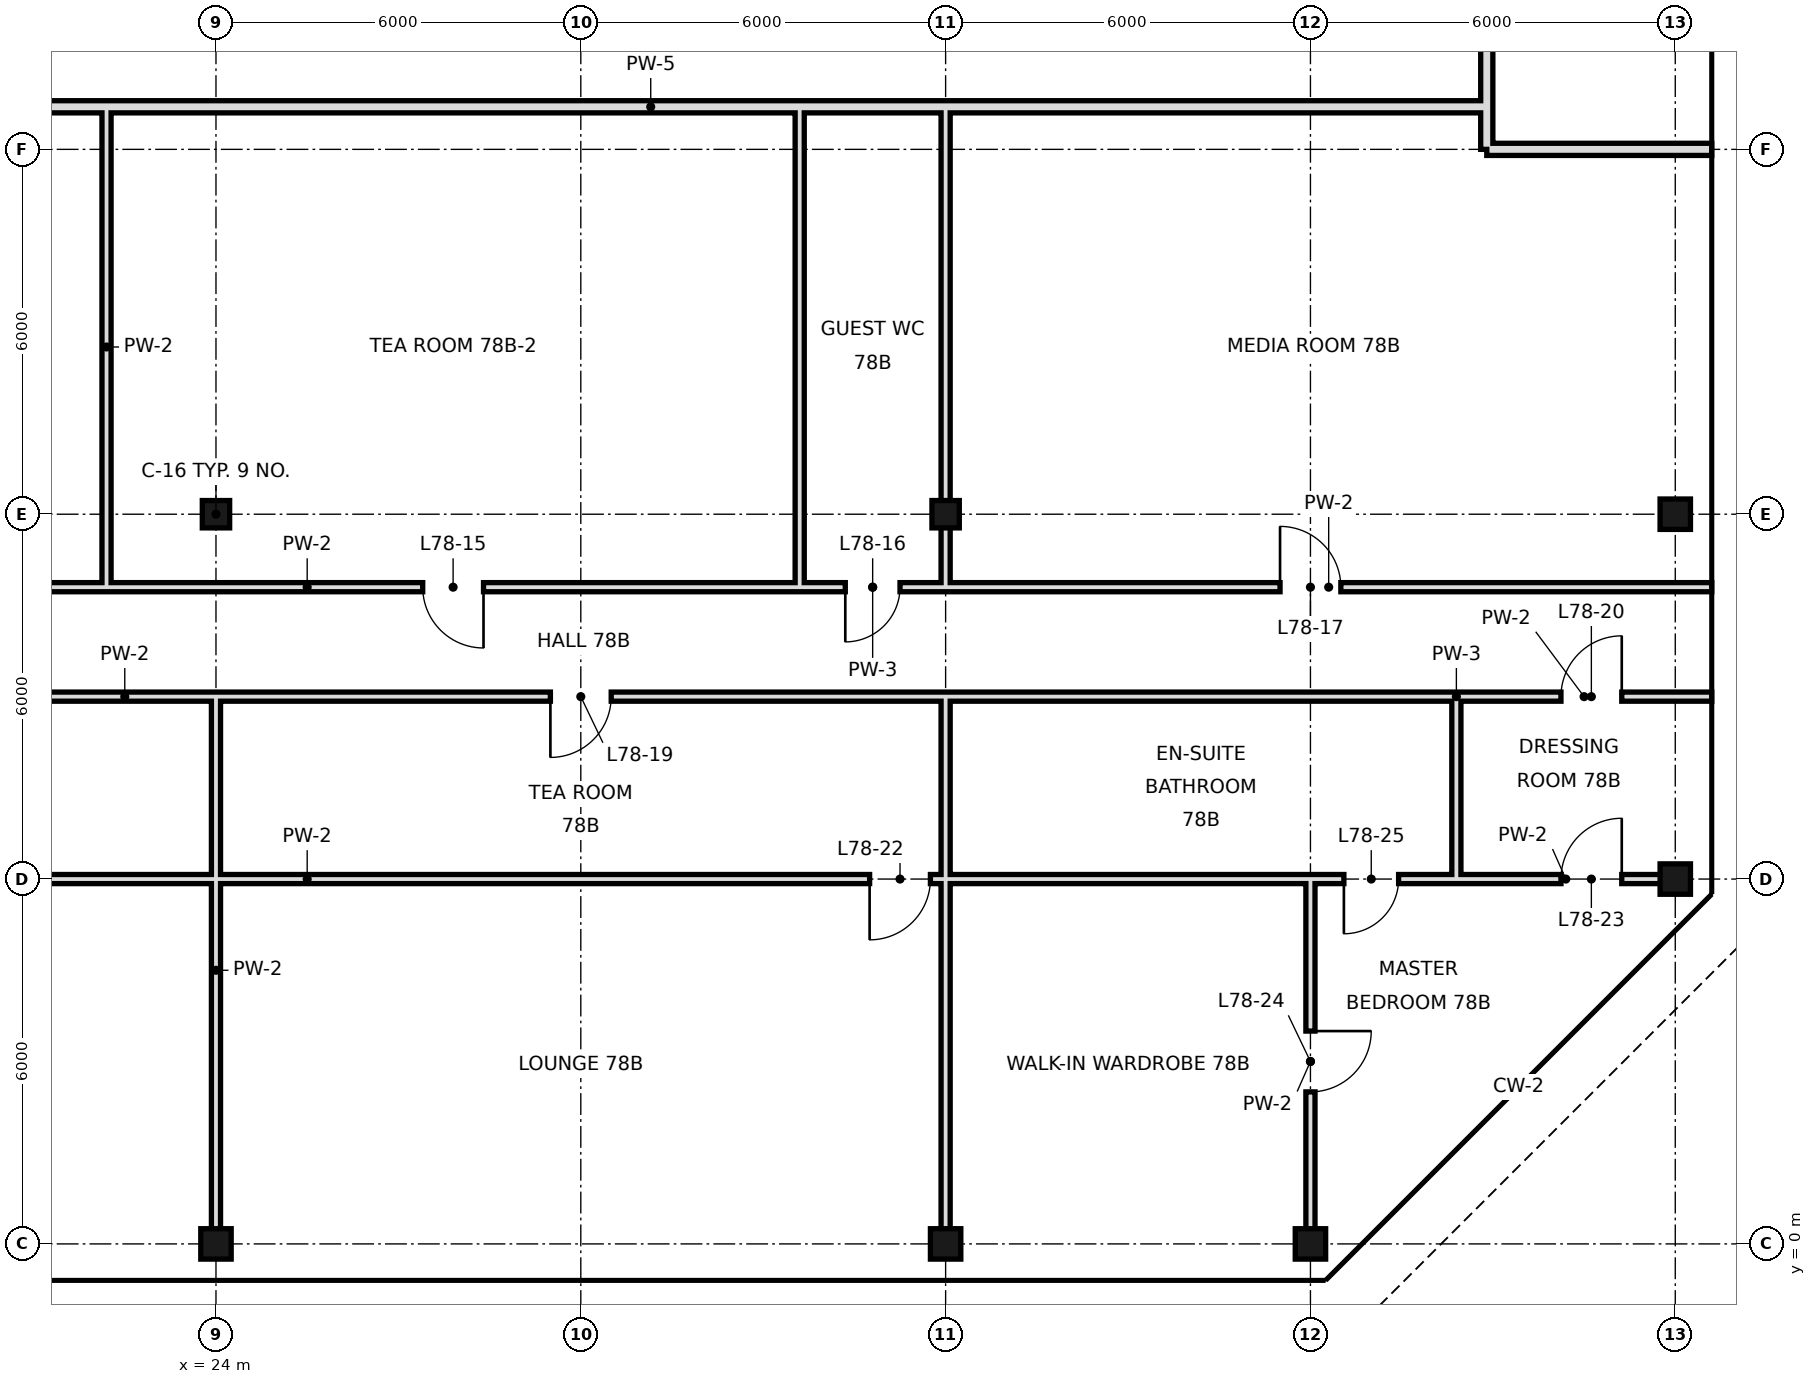
"""IFC4 building model, lengths in metres.
Left out: names, types, materials, properties, quantities, classifications, styles, units other than length and angle.
Written with IfcOpenShell. Run it as: python <this file> out.ifc"""

import sys

from ifc_helpers import new_model, si_unit, direction, frame, frame_2d, origin, origin_2d, place, context, subcontext, project, spatial, rectangle, hollow_rectangle, extrude, element, fill, save


model = new_model("IFC4")
c1 = context("Model", 3, precision=1e-05, world=origin(), true_north=direction((0.0, 1.0)))
c2 = subcontext(c1, "Body", "Model", "MODEL_VIEW")
j1 = project(units=[si_unit("LENGTHUNIT", "METRE"), si_unit("PLANEANGLEUNIT", "RADIAN")], contexts=[c1])
p1 = place(None, origin())
s1 = spatial("IfcSite", under=j1, at=p1, CompositionType="ELEMENT")
p2 = place(p1, origin())
s2 = spatial("IfcBuilding", under=s1, at=p2, CompositionType="ELEMENT")
p3 = place(p2, frame((0.0, 0.0, 326.8)))
s3 = spatial("IfcBuildingStorey", under=s2, at=p3, CompositionType="ELEMENT", Elevation=326.8)
p4 = place(p3, frame((24.0, 0.0, 0.0), z_axis=(0.0, 0.0, 1.0), x_axis=(1.0, 0.0, 0.0)))
e1 = element("IfcColumn", 1, at=p4, inside=s3, PredefinedType="COLUMN", context=c2, shape_type="SweptSolid", body=[
    extrude(hollow_rectangle(XDim=0.5, YDim=0.5, WallThickness=0.025, at=origin_2d()), origin(), (0.0, 0.0, 1.0), 4.4),
])
p5 = place(p3, frame((24.0, 12.0, 0.0), z_axis=(0.0, 0.0, 1.0), x_axis=(1.0, 0.0, 0.0)))
e2 = element("IfcColumn", 2, at=p5, inside=s3, PredefinedType="COLUMN", context=c2, shape_type="SweptSolid", body=[
    extrude(hollow_rectangle(XDim=0.45, YDim=0.45, WallThickness=0.022, at=origin_2d()), origin(), (0.0, 0.0, 1.0), 4.4),
])
p6 = place(p3, frame((36.0, 0.0, 0.0), z_axis=(0.0, 0.0, 1.0), x_axis=(1.0, 0.0, 0.0)))
e3 = element("IfcColumn", 3, at=p6, inside=s3, PredefinedType="COLUMN", context=c2, shape_type="SweptSolid", body=[
    extrude(hollow_rectangle(XDim=0.5, YDim=0.5, WallThickness=0.025, at=origin_2d()), origin(), (0.0, 0.0, 1.0), 4.4),
])
p7 = place(p3, frame((36.0, 12.0, 0.0), z_axis=(0.0, 0.0, 1.0), x_axis=(1.0, 0.0, 0.0)))
e4 = element("IfcColumn", 4, at=p7, inside=s3, PredefinedType="COLUMN", context=c2, shape_type="SweptSolid", body=[
    extrude(hollow_rectangle(XDim=0.45, YDim=0.45, WallThickness=0.022, at=origin_2d()), origin(), (0.0, 0.0, 1.0), 4.4),
])
for number, where, z_axis, x_axis in (
    (5, (42.0, 0.0, 0.0), (0.0, 0.0, 1.0), (1.0, 0.0, 0.0)),
    (6, (48.0, 6.0, 0.0), (0.0, 0.0, 1.0), (1.0, 0.0, 0.0)),
    (7, (48.0, 12.0, 0.0), (0.0, 0.0, 1.0), (1.0, 0.0, 0.0)),
):
    element("IfcColumn", number, at=place(p3, frame(where, z_axis=z_axis, x_axis=x_axis)), inside=s3, PredefinedType="COLUMN", context=c2, shape_type="SweptSolid", body=[
        extrude(hollow_rectangle(XDim=0.5, YDim=0.5, WallThickness=0.025, at=origin_2d()), origin(), (0.0, 0.0, 1.0), 4.4),
    ])
p8 = place(p3, frame((22.2, 10.8, 0.0), z_axis=(0.0, 0.0, 1.0), x_axis=(0.0, 1.0, 0.0)))
e8 = element("IfcWall", 8, at=p8, inside=s3, PredefinedType="PARTITIONING", context=c2, shape_type="SweptSolid", body=[
    extrude(rectangle(XDim=7.9, YDim=0.15, at=frame_2d((3.95, 0.0))), origin(), (0.0, 0.0, 1.0), 4.1),
])
p9 = place(p3, frame((24.0, 0.0, 0.0), z_axis=(0.0, 0.0, 1.0), x_axis=(0.0, 1.0, 0.0)))
e9 = element("IfcWall", 9, at=p9, inside=s3, PredefinedType="PARTITIONING", context=c2, shape_type="SweptSolid", body=[
    extrude(rectangle(XDim=9.0, YDim=0.15, at=frame_2d((4.5, 0.0))), origin(), (0.0, 0.0, 1.0), 3.4),
])
p10 = place(p3, frame((33.6, 10.8, 0.0), z_axis=(0.0, 0.0, 1.0), x_axis=(0.0, 1.0, 0.0)))
e10 = element("IfcWall", 10, at=p10, inside=s3, PredefinedType="PARTITIONING", context=c2, shape_type="SweptSolid", body=[
    extrude(rectangle(XDim=7.9, YDim=0.15, at=frame_2d((3.95, 0.0))), origin(), (0.0, 0.0, 1.0), 4.1),
])
p11 = place(p3, frame((36.0, 0.0, 0.0), z_axis=(0.0, 0.0, 1.0), x_axis=(0.0, 1.0, 0.0)))
e11 = element("IfcWall", 11, at=p11, inside=s3, PredefinedType="PARTITIONING", context=c2, shape_type="SweptSolid", body=[
    extrude(rectangle(XDim=6.0, YDim=0.15, at=frame_2d((3.0, 0.0))), origin(), (0.0, 0.0, 1.0), 3.4),
])
p12 = place(p3, frame((36.0, 6.0, 0.0), z_axis=(0.0, 0.0, 1.0), x_axis=(0.0, 1.0, 0.0)))
e12 = element("IfcWall", 12, at=p12, inside=s3, PredefinedType="PARTITIONING", context=c2, shape_type="SweptSolid", body=[
    extrude(rectangle(XDim=3.0, YDim=0.15, at=frame_2d((1.5, 0.0))), origin(), (0.0, 0.0, 1.0), 3.4),
])
p13 = place(p3, frame((36.0, 10.8, 0.0), z_axis=(0.0, 0.0, 1.0), x_axis=(0.0, 1.0, 0.0)))
e13 = element("IfcWall", 13, at=p13, inside=s3, PredefinedType="PARTITIONING", context=c2, shape_type="SweptSolid", body=[
    extrude(rectangle(XDim=7.9, YDim=0.15, at=frame_2d((3.95, 0.0))), origin(), (0.0, 0.0, 1.0), 3.4),
])
p14 = place(p3, frame((42.0, 0.0, 0.0), z_axis=(0.0, 0.0, 1.0), x_axis=(0.0, 1.0, 0.0)))
e14 = element("IfcWall", 14, at=p14, inside=s3, PredefinedType="PARTITIONING", context=c2, shape_type="SweptSolid", body=[
    extrude(rectangle(XDim=6.0, YDim=0.15, at=frame_2d((3.0, 0.0))), origin(), (0.0, 0.0, 1.0), 3.4),
])
p15 = place(p14, frame((2.5, 0.0, 0.0)))
e15 = element("IfcOpeningElement", 15, at=p15, cuts=e14, PredefinedType="OPENING", context=c2, shape_type="SweptSolid", body=[
    extrude(rectangle(XDim=1.0, YDim=2.4, at=frame_2d((0.5, 1.2))), frame((0.0, 0.085, 0.0), z_axis=(0.0, -1.0, 0.0), x_axis=(1.0, 0.0, 0.0)), (0.0, 0.0, 1.0), 0.17),
])
p16 = place(p3, frame((44.4, 6.0, 0.0), z_axis=(0.0, 0.0, 1.0), x_axis=(0.0, 1.0, 0.0)))
e16 = element("IfcWall", 16, at=p16, inside=s3, PredefinedType="PARTITIONING", context=c2, shape_type="SweptSolid", body=[
    extrude(rectangle(XDim=3.0, YDim=0.15, at=frame_2d((1.5, 0.0))), origin(), (0.0, 0.0, 1.0), 4.1),
])
p17 = place(p3, frame((44.9, 18.0, 0.0), z_axis=(0.0, 0.0, 1.0), x_axis=(0.0, 1.0, 0.0)))
e17 = element("IfcWall", 17, at=p17, inside=s3, PredefinedType="SOLIDWALL", context=c2, shape_type="SweptSolid", body=[
    extrude(rectangle(XDim=27.949, YDim=0.2, at=frame_2d((13.975, 0.0))), origin(), (0.0, 0.0, 1.0), 3.5),
])
p18 = place(p17, frame((8.36, 0.0, 0.0)))
e18 = element("IfcOpeningElement", 18, at=p18, cuts=e17, PredefinedType="OPENING", context=c2, shape_type="SweptSolid", body=[
    extrude(rectangle(XDim=1.2, YDim=2.4, at=frame_2d((0.6, 1.2))), frame((0.0, 0.11, 0.0), z_axis=(0.0, -1.0, 0.0), x_axis=(1.0, 0.0, 0.0)), (0.0, 0.0, 1.0), 0.22),
])
p19 = place(p3, frame((17.4, 10.8, 0.0), z_axis=(0.0, 0.0, 1.0), x_axis=(1.0, 0.0, 0.0)))
e19 = element("IfcWall", 19, at=p19, inside=s3, PredefinedType="PARTITIONING", context=c2, shape_type="SweptSolid", body=[
    extrude(rectangle(XDim=16.2, YDim=0.15, at=frame_2d((8.1, 0.0))), origin(), (0.0, 0.0, 1.0), 4.1),
])
p20 = place(p19, frame((2.56, 0.0, 0.0)))
e20 = element("IfcOpeningElement", 20, at=p20, cuts=e19, PredefinedType="OPENING", context=c2, shape_type="SweptSolid", body=[
    extrude(rectangle(XDim=1.0, YDim=2.4, at=frame_2d((0.5, 1.2))), frame((0.0, 0.085, 0.0), z_axis=(0.0, -1.0, 0.0), x_axis=(1.0, 0.0, 0.0)), (0.0, 0.0, 1.0), 0.17),
])
p21 = place(p19, frame((10.0, 0.0, 0.0)))
e21 = element("IfcOpeningElement", 21, at=p21, cuts=e19, PredefinedType="OPENING", context=c2, shape_type="SweptSolid", body=[
    extrude(rectangle(XDim=1.0, YDim=2.4, at=frame_2d((0.5, 1.2))), frame((0.0, 0.085, 0.0), z_axis=(0.0, -1.0, 0.0), x_axis=(1.0, 0.0, 0.0)), (0.0, 0.0, 1.0), 0.17),
])
p22 = place(p3, frame((36.0, 10.8, 0.0), z_axis=(0.0, 0.0, 1.0), x_axis=(1.0, 0.0, 0.0)))
e22 = element("IfcWall", 22, at=p22, inside=s3, PredefinedType="PARTITIONING", context=c2, shape_type="SweptSolid", body=[
    extrude(rectangle(XDim=12.6, YDim=0.15, at=frame_2d((6.3, 0.0))), origin(), (0.0, 0.0, 1.0), 4.1),
])
p23 = place(p22, frame((5.5, 0.0, 0.0)))
e23 = element("IfcOpeningElement", 23, at=p23, cuts=e22, PredefinedType="OPENING", context=c2, shape_type="SweptSolid", body=[
    extrude(rectangle(XDim=1.0, YDim=2.4, at=frame_2d((0.5, 1.2))), frame((0.0, 0.085, 0.0), z_axis=(0.0, -1.0, 0.0), x_axis=(1.0, 0.0, 0.0)), (0.0, 0.0, 1.0), 0.17),
])
p24 = place(p3, frame((33.6, 10.8, 0.0), z_axis=(0.0, 0.0, 1.0), x_axis=(1.0, 0.0, 0.0)))
e24 = element("IfcWall", 24, at=p24, inside=s3, PredefinedType="PARTITIONING", context=c2, shape_type="SweptSolid", body=[
    extrude(rectangle(XDim=2.4, YDim=0.15, at=frame_2d((1.2, 0.0))), origin(), (0.0, 0.0, 1.0), 4.1),
])
p25 = place(p24, frame((0.75, 0.0, 0.0)))
e25 = element("IfcOpeningElement", 25, at=p25, cuts=e24, PredefinedType="OPENING", context=c2, shape_type="SweptSolid", body=[
    extrude(rectangle(XDim=0.9, YDim=2.4, at=frame_2d((0.45, 1.2))), frame((0.0, 0.085, 0.0), z_axis=(0.0, -1.0, 0.0), x_axis=(1.0, 0.0, 0.0)), (0.0, 0.0, 1.0), 0.17),
])
p26 = place(p3, frame((44.9, 18.0, 0.0), z_axis=(0.0, 0.0, 1.0), x_axis=(1.0, 0.0, 0.0)))
e26 = element("IfcWall", 26, at=p26, inside=s3, PredefinedType="SOLIDWALL", context=c2, shape_type="SweptSolid", body=[
    extrude(rectangle(XDim=3.7, YDim=0.2, at=frame_2d((1.85, 0.0))), origin(), (0.0, 0.0, 1.0), 3.4),
])
p27 = place(p3, frame((17.4, 18.7, 0.0), z_axis=(0.0, 0.0, 1.0), x_axis=(1.0, 0.0, 0.0)))
e27 = element("IfcWall", 27, at=p27, inside=s3, PredefinedType="SOLIDWALL", context=c2, shape_type="SweptSolid", body=[
    extrude(rectangle(XDim=27.5, YDim=0.2, at=frame_2d((13.75, 0.0))), origin(), (0.0, 0.0, 1.0), 3.4),
])
p28 = place(p27, frame((1.8, 0.0, 0.0)))
e28 = element("IfcOpeningElement", 28, at=p28, cuts=e27, PredefinedType="OPENING", context=c2, shape_type="SweptSolid", body=[
    extrude(rectangle(XDim=1.2, YDim=2.4, at=frame_2d((0.6, 1.2))), frame((0.0, 0.11, 0.0), z_axis=(0.0, -1.0, 0.0), x_axis=(1.0, 0.0, 0.0)), (0.0, 0.0, 1.0), 0.22),
])
p29 = place(p3, frame((9.0, 6.0, 0.0), z_axis=(0.0, 0.0, 1.0), x_axis=(1.0, 0.0, 0.0)))
e29 = element("IfcWall", 29, at=p29, inside=s3, PredefinedType="PARTITIONING", context=c2, shape_type="SweptSolid", body=[
    extrude(rectangle(XDim=27.0, YDim=0.15, at=frame_2d((13.5, 0.0))), origin(), (0.0, 0.0, 1.0), 3.65),
])
p30 = place(p29, frame((0.7, 0.0, 0.0)))
e30 = element("IfcOpeningElement", 30, at=p30, cuts=e29, PredefinedType="OPENING", context=c2, shape_type="SweptSolid", body=[
    extrude(rectangle(XDim=1.0, YDim=2.4, at=frame_2d((0.5, 1.2))), frame((0.0, 0.085, 0.0), z_axis=(0.0, -1.0, 0.0), x_axis=(1.0, 0.0, 0.0)), (0.0, 0.0, 1.0), 0.17),
])
p31 = place(p29, frame((3.25, 0.0, 0.0)))
e31 = element("IfcOpeningElement", 31, at=p31, cuts=e29, PredefinedType="OPENING", context=c2, shape_type="SweptSolid", body=[
    extrude(rectangle(XDim=1.8, YDim=2.4, at=frame_2d((0.9, 1.2))), frame((0.0, 0.085, 0.0), z_axis=(0.0, -1.0, 0.0), x_axis=(1.0, 0.0, 0.0)), (0.0, 0.0, 1.0), 0.17),
])
p32 = place(p29, frame((25.75, 0.0, 0.0)))
e32 = element("IfcOpeningElement", 32, at=p32, cuts=e29, PredefinedType="OPENING", context=c2, shape_type="SweptSolid", body=[
    extrude(rectangle(XDim=1.0, YDim=2.4, at=frame_2d((0.5, 1.2))), frame((0.0, 0.085, 0.0), z_axis=(0.0, -1.0, 0.0), x_axis=(1.0, 0.0, 0.0)), (0.0, 0.0, 1.0), 0.17),
])
p33 = place(p3, frame((44.4, 6.0, 0.0), z_axis=(0.0, 0.0, 1.0), x_axis=(1.0, 0.0, 0.0)))
e33 = element("IfcWall", 33, at=p33, inside=s3, PredefinedType="PARTITIONING", context=c2, shape_type="SweptSolid", body=[
    extrude(rectangle(XDim=3.6, YDim=0.15, at=frame_2d((1.8, 0.0))), origin(), (0.0, 0.0, 1.0), 3.65),
])
p34 = place(p33, frame((1.72, 0.0, 0.0)))
e34 = element("IfcOpeningElement", 34, at=p34, cuts=e33, PredefinedType="OPENING", context=c2, shape_type="SweptSolid", body=[
    extrude(rectangle(XDim=1.0, YDim=2.4, at=frame_2d((0.5, 1.2))), frame((0.0, 0.085, 0.0), z_axis=(0.0, -1.0, 0.0), x_axis=(1.0, 0.0, 0.0)), (0.0, 0.0, 1.0), 0.17),
])
p35 = place(p3, frame((36.0, 6.0, 0.0), z_axis=(0.0, 0.0, 1.0), x_axis=(1.0, 0.0, 0.0)))
e35 = element("IfcWall", 35, at=p35, inside=s3, PredefinedType="PARTITIONING", context=c2, shape_type="SweptSolid", body=[
    extrude(rectangle(XDim=8.4, YDim=0.15, at=frame_2d((4.2, 0.0))), origin(), (0.0, 0.0, 1.0), 3.65),
])
p36 = place(p35, frame((6.55, 0.0, 0.0)))
e36 = element("IfcOpeningElement", 36, at=p36, cuts=e35, PredefinedType="OPENING", context=c2, shape_type="SweptSolid", body=[
    extrude(rectangle(XDim=0.9, YDim=2.4, at=frame_2d((0.45, 1.2))), frame((0.0, 0.085, 0.0), z_axis=(0.0, -1.0, 0.0), x_axis=(1.0, 0.0, 0.0)), (0.0, 0.0, 1.0), 0.17),
])
p37 = place(p3, frame((9.0, 9.0, 0.0), z_axis=(0.0, 0.0, 1.0), x_axis=(1.0, 0.0, 0.0)))
e37 = element("IfcWall", 37, at=p37, inside=s3, PredefinedType="PARTITIONING", context=c2, shape_type="SweptSolid", body=[
    extrude(rectangle(XDim=27.0, YDim=0.15, at=frame_2d((13.5, 0.0))), origin(), (0.0, 0.0, 1.0), 4.1),
])
p38 = place(p37, frame((0.7, 0.0, 0.0)))
e38 = element("IfcOpeningElement", 38, at=p38, cuts=e37, PredefinedType="OPENING", context=c2, shape_type="SweptSolid", body=[
    extrude(rectangle(XDim=1.0, YDim=2.4, at=frame_2d((0.5, 1.2))), frame((0.0, 0.085, 0.0), z_axis=(0.0, -1.0, 0.0), x_axis=(1.0, 0.0, 0.0)), (0.0, 0.0, 1.0), 0.17),
])
p39 = place(p37, frame((8.1, 0.0, 0.0)))
e39 = element("IfcOpeningElement", 39, at=p39, cuts=e37, PredefinedType="OPENING", context=c2, shape_type="SweptSolid", body=[
    extrude(rectangle(XDim=1.8, YDim=2.4, at=frame_2d((0.9, 1.2))), frame((0.0, 0.085, 0.0), z_axis=(0.0, -1.0, 0.0), x_axis=(1.0, 0.0, 0.0)), (0.0, 0.0, 1.0), 0.17),
])
p40 = place(p37, frame((20.5, 0.0, 0.0)))
e40 = element("IfcOpeningElement", 40, at=p40, cuts=e37, PredefinedType="OPENING", context=c2, shape_type="SweptSolid", body=[
    extrude(rectangle(XDim=1.0, YDim=2.4, at=frame_2d((0.5, 1.2))), frame((0.0, 0.085, 0.0), z_axis=(0.0, -1.0, 0.0), x_axis=(1.0, 0.0, 0.0)), (0.0, 0.0, 1.0), 0.17),
])
p41 = place(p3, frame((44.4, 9.0, 0.0), z_axis=(0.0, 0.0, 1.0), x_axis=(1.0, 0.0, 0.0)))
e41 = element("IfcWall", 41, at=p41, inside=s3, PredefinedType="PARTITIONING", context=c2, shape_type="SweptSolid", body=[
    extrude(rectangle(XDim=4.2, YDim=0.15, at=frame_2d((2.1, 0.0))), origin(), (0.0, 0.0, 1.0), 4.1),
])
p42 = place(p41, frame((1.72, 0.0, 0.0)))
e42 = element("IfcOpeningElement", 42, at=p42, cuts=e41, PredefinedType="OPENING", context=c2, shape_type="SweptSolid", body=[
    extrude(rectangle(XDim=1.0, YDim=2.4, at=frame_2d((0.5, 1.2))), frame((0.0, 0.085, 0.0), z_axis=(0.0, -1.0, 0.0), x_axis=(1.0, 0.0, 0.0)), (0.0, 0.0, 1.0), 0.17),
])
p43 = place(p3, frame((36.0, 9.0, 0.0), z_axis=(0.0, 0.0, 1.0), x_axis=(1.0, 0.0, 0.0)))
e43 = element("IfcWall", 43, at=p43, inside=s3, PredefinedType="PARTITIONING", context=c2, shape_type="SweptSolid", body=[
    extrude(rectangle(XDim=8.4, YDim=0.15, at=frame_2d((4.2, 0.0))), origin(), (0.0, 0.0, 1.0), 4.1),
])
p44 = place(p21, origin())
e44 = element("IfcDoor", 44, at=p44, inside=s3, OperationType="SINGLE_SWING_RIGHT", PredefinedType="DOOR", context=c2, shape_type="SweptSolid", body=[
    extrude(rectangle(XDim=1.0, YDim=2.4, at=frame_2d((0.5, 1.2))), frame((0.0, 0.025, 0.0), z_axis=(0.0, -1.0, 0.0), x_axis=(1.0, 0.0, 0.0)), (0.0, 0.0, 1.0), 0.05),
])
fill(e21, e44)
p45 = place(p25, frame((0.9, 0.0, 0.0), z_axis=(0.0, 0.0, 1.0), x_axis=(-1.0, 0.0, 0.0)))
e45 = element("IfcDoor", 45, at=p45, inside=s3, OperationType="SINGLE_SWING_RIGHT", PredefinedType="DOOR", context=c2, shape_type="SweptSolid", body=[
    extrude(rectangle(XDim=0.9, YDim=2.4, at=frame_2d((0.45, 1.2))), frame((0.0, 0.025, 0.0), z_axis=(0.0, -1.0, 0.0), x_axis=(1.0, 0.0, 0.0)), (0.0, 0.0, 1.0), 0.05),
])
fill(e25, e45)
p46 = place(p23, origin())
e46 = element("IfcDoor", 46, at=p46, inside=s3, OperationType="SINGLE_SWING_LEFT", PredefinedType="DOOR", context=c2, shape_type="SweptSolid", body=[
    extrude(rectangle(XDim=1.0, YDim=2.4, at=frame_2d((0.5, 1.2))), frame((0.0, 0.025, 0.0), z_axis=(0.0, -1.0, 0.0), x_axis=(1.0, 0.0, 0.0)), (0.0, 0.0, 1.0), 0.05),
])
fill(e23, e46)
p47 = place(p40, frame((1.0, 0.0, 0.0), z_axis=(0.0, 0.0, 1.0), x_axis=(-1.0, 0.0, 0.0)))
e47 = element("IfcDoor", 47, at=p47, inside=s3, OperationType="SINGLE_SWING_RIGHT", PredefinedType="DOOR", context=c2, shape_type="SweptSolid", body=[
    extrude(rectangle(XDim=1.0, YDim=2.4, at=frame_2d((0.5, 1.2))), frame((0.0, 0.025, 0.0), z_axis=(0.0, -1.0, 0.0), x_axis=(1.0, 0.0, 0.0)), (0.0, 0.0, 1.0), 0.05),
])
fill(e40, e47)
p48 = place(p42, frame((1.0, 0.0, 0.0), z_axis=(0.0, 0.0, 1.0), x_axis=(-1.0, 0.0, 0.0)))
e48 = element("IfcDoor", 48, at=p48, inside=s3, OperationType="SINGLE_SWING_LEFT", PredefinedType="DOOR", context=c2, shape_type="SweptSolid", body=[
    extrude(rectangle(XDim=1.0, YDim=2.4, at=frame_2d((0.5, 1.2))), frame((0.0, 0.025, 0.0), z_axis=(0.0, -1.0, 0.0), x_axis=(1.0, 0.0, 0.0)), (0.0, 0.0, 1.0), 0.05),
])
fill(e42, e48)
p49 = place(p32, frame((1.0, 0.0, 0.0), z_axis=(0.0, 0.0, 1.0), x_axis=(-1.0, 0.0, 0.0)))
e49 = element("IfcDoor", 49, at=p49, inside=s3, OperationType="SINGLE_SWING_RIGHT", PredefinedType="DOOR", context=c2, shape_type="SweptSolid", body=[
    extrude(rectangle(XDim=1.0, YDim=2.4, at=frame_2d((0.5, 1.2))), frame((0.0, 0.025, 0.0), z_axis=(0.0, -1.0, 0.0), x_axis=(1.0, 0.0, 0.0)), (0.0, 0.0, 1.0), 0.05),
])
fill(e32, e49)
p50 = place(p34, frame((1.0, 0.0, 0.0), z_axis=(0.0, 0.0, 1.0), x_axis=(-1.0, 0.0, 0.0)))
e50 = element("IfcDoor", 50, at=p50, inside=s3, OperationType="SINGLE_SWING_LEFT", PredefinedType="DOOR", context=c2, shape_type="SweptSolid", body=[
    extrude(rectangle(XDim=1.0, YDim=2.4, at=frame_2d((0.5, 1.2))), frame((0.0, 0.025, 0.0), z_axis=(0.0, -1.0, 0.0), x_axis=(1.0, 0.0, 0.0)), (0.0, 0.0, 1.0), 0.05),
])
fill(e34, e50)
p51 = place(p15, origin())
e51 = element("IfcDoor", 51, at=p51, inside=s3, OperationType="SINGLE_SWING_RIGHT", PredefinedType="DOOR", context=c2, shape_type="SweptSolid", body=[
    extrude(rectangle(XDim=1.0, YDim=2.4, at=frame_2d((0.5, 1.2))), frame((0.0, 0.025, 0.0), z_axis=(0.0, -1.0, 0.0), x_axis=(1.0, 0.0, 0.0)), (0.0, 0.0, 1.0), 0.05),
])
fill(e15, e51)
p52 = place(p36, frame((0.9, 0.0, 0.0), z_axis=(0.0, 0.0, 1.0), x_axis=(-1.0, 0.0, 0.0)))
e52 = element("IfcDoor", 52, at=p52, inside=s3, OperationType="SINGLE_SWING_RIGHT", PredefinedType="DOOR", context=c2, shape_type="SweptSolid", body=[
    extrude(rectangle(XDim=0.9, YDim=2.4, at=frame_2d((0.45, 1.2))), frame((0.0, 0.025, 0.0), z_axis=(0.0, -1.0, 0.0), x_axis=(1.0, 0.0, 0.0)), (0.0, 0.0, 1.0), 0.05),
])
fill(e36, e52)
save(model, sys.argv[1])
